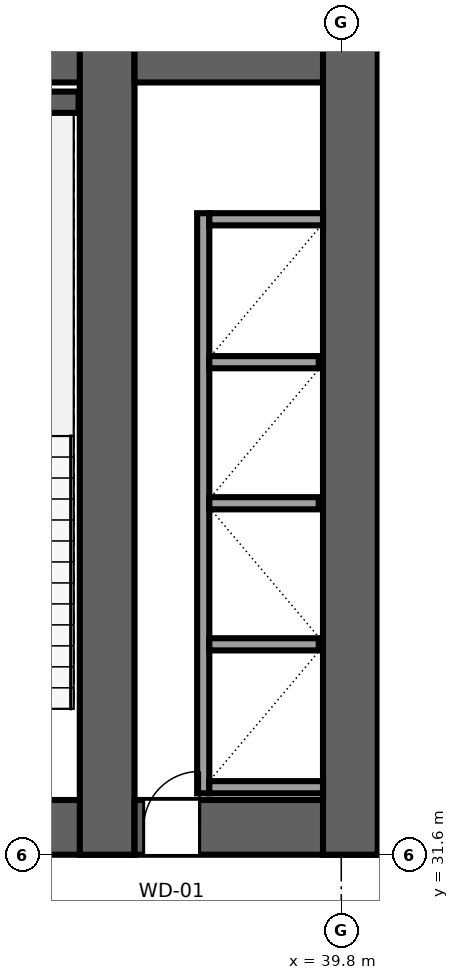
"""IFC4 building model, lengths in metres.
Left out: names, types, materials, properties, quantities, classifications, styles, units other than length and angle.
Written with IfcOpenShell. Run it as: python <this file> out.ifc"""

import sys

from ifc_helpers import new_model, si_unit, direction, frame, frame_2d, origin, place, context, subcontext, project, spatial, rectangle, extrude, source, transform, mapped, element, fill, save


model = new_model("IFC4")
c1 = context("Model", 3, precision=1e-05, world=origin(), true_north=direction((0.0, 1.0)))
c2 = subcontext(c1, "Body", "Model", "MODEL_VIEW")
j1 = project(units=[si_unit("LENGTHUNIT", "METRE"), si_unit("PLANEANGLEUNIT", "RADIAN")], contexts=[c1])
p1 = place(None, origin())
s1 = spatial("IfcSite", under=j1, at=p1, CompositionType="ELEMENT")
p2 = place(p1, origin())
s2 = spatial("IfcBuilding", under=s1, at=p2, CompositionType="ELEMENT")
p3 = place(p2, frame((0.0, 0.0, 11.0)))
s3 = spatial("IfcBuildingStorey", under=s2, at=p3, CompositionType="ELEMENT", Elevation=11.0)
p4 = place(p3, frame((9.6, 32.05, 0.0), z_axis=(0.0, 0.0, 1.0), x_axis=(1.0, 0.0, 0.0)))
e1 = element("IfcWall", 1, at=p4, inside=s3, PredefinedType="SHEAR", context=c2, shape_type="SweptSolid", body=[
    extrude(rectangle(XDim=26.8, YDim=0.9, at=frame_2d((13.4, 0.0))), origin(), (0.0, 0.0, 1.0), 5.0),
])
p5 = place(p4, frame((6.52, 0.0, 0.0), z_axis=(0.0, 0.0, 1.0), x_axis=(-1.0, 0.0, 0.0)))
e2 = element("IfcOpeningElement", 2, at=p5, cuts=e1, PredefinedType="OPENING", context=c2, shape_type="SweptSolid", body=[
    extrude(rectangle(XDim=1.5, YDim=2.04, at=frame_2d((0.75, 1.02))), frame((0.0, 0.46, 0.0), z_axis=(0.0, -1.0, 0.0), x_axis=(1.0, 0.0, 0.0)), (0.0, 0.0, 1.0), 0.92),
])
p6 = place(p4, frame((14.15, 0.0, 0.0), z_axis=(0.0, 0.0, 1.0), x_axis=(-1.0, 0.0, 0.0)))
e3 = element("IfcOpeningElement", 3, at=p6, cuts=e1, PredefinedType="OPENING", context=c2, shape_type="SweptSolid", body=[
    extrude(rectangle(XDim=1.5, YDim=2.04, at=frame_2d((0.75, 1.02))), frame((0.0, 0.46, 0.0), z_axis=(0.0, -1.0, 0.0), x_axis=(1.0, 0.0, 0.0)), (0.0, 0.0, 1.0), 0.92),
])
p7 = place(p4, frame((21.78, 0.0, 0.0), z_axis=(0.0, 0.0, 1.0), x_axis=(-1.0, 0.0, 0.0)))
e4 = element("IfcOpeningElement", 4, at=p7, cuts=e1, PredefinedType="OPENING", context=c2, shape_type="SweptSolid", body=[
    extrude(rectangle(XDim=1.5, YDim=2.04, at=frame_2d((0.75, 1.02))), frame((0.0, 0.46, 0.0), z_axis=(0.0, -1.0, 0.0), x_axis=(1.0, 0.0, 0.0)), (0.0, 0.0, 1.0), 0.92),
])
p8 = place(p4, frame((8.57, 0.0, 0.0), z_axis=(0.0, 0.0, 1.0), x_axis=(-1.0, 0.0, 0.0)))
e5 = element("IfcOpeningElement", 5, at=p8, cuts=e1, PredefinedType="OPENING", context=c2, shape_type="SweptSolid", body=[
    extrude(rectangle(XDim=0.82, YDim=2.01, at=frame_2d((0.41, 1.005))), frame((0.0, 0.46, 0.0), z_axis=(0.0, -1.0, 0.0), x_axis=(1.0, 0.0, 0.0)), (0.0, 0.0, 1.0), 0.92),
])
p9 = place(p4, frame((19.07, 0.0, 0.0), z_axis=(0.0, 0.0, 1.0), x_axis=(-1.0, 0.0, 0.0)))
e6 = element("IfcOpeningElement", 6, at=p9, cuts=e1, PredefinedType="OPENING", context=c2, shape_type="SweptSolid", body=[
    extrude(rectangle(XDim=0.82, YDim=2.01, at=frame_2d((0.41, 1.005))), frame((0.0, 0.46, 0.0), z_axis=(0.0, -1.0, 0.0), x_axis=(1.0, 0.0, 0.0)), (0.0, 0.0, 1.0), 0.92),
])
p10 = place(p3, frame((9.6, 44.75, 0.0), z_axis=(0.0, 0.0, 1.0), x_axis=(1.0, 0.0, 0.0)))
e7 = element("IfcWall", 7, at=p10, inside=s3, PredefinedType="SHEAR", context=c2, shape_type="SweptSolid", body=[
    extrude(rectangle(XDim=26.8, YDim=0.9, at=frame_2d((13.4, 0.0))), origin(), (0.0, 0.0, 1.0), 5.0),
])
p11 = place(p3, frame((35.95, 31.6, 0.0), z_axis=(0.0, 0.0, 1.0), x_axis=(0.0, 1.0, 0.0)))
e8 = element("IfcWall", 8, at=p11, inside=s3, PredefinedType="SHEAR", context=c2, shape_type="SweptSolid", body=[
    extrude(rectangle(XDim=13.6, YDim=0.9, at=frame_2d((6.8, 0.0))), origin(), (0.0, 0.0, 1.0), 5.0),
])
p12 = place(p3, frame((36.4, 32.05, 0.0), z_axis=(0.0, 0.0, 1.0), x_axis=(1.0, 0.0, 0.0)))
e9 = element("IfcWall", 9, at=p12, inside=s3, PredefinedType="SHEAR", context=c2, shape_type="SweptSolid", body=[
    extrude(rectangle(XDim=4.0, YDim=0.9, at=frame_2d((2.0, 0.0))), origin(), (0.0, 0.0, 1.0), 5.0),
])
p13 = place(p12, frame((1.07, 0.0, 0.0), z_axis=(0.0, 0.0, 1.0), x_axis=(-1.0, 0.0, 0.0)))
e10 = element("IfcOpeningElement", 10, at=p13, cuts=e9, PredefinedType="OPENING", context=c2, shape_type="SweptSolid", body=[
    extrude(rectangle(XDim=0.92, YDim=2.01, at=frame_2d((0.46, 1.005))), frame((0.0, 0.46, 0.0), z_axis=(0.0, -1.0, 0.0), x_axis=(1.0, 0.0, 0.0)), (0.0, 0.0, 1.0), 0.92),
])
p14 = place(p3, frame((36.4, 44.75, 0.0), z_axis=(0.0, 0.0, 1.0), x_axis=(1.0, 0.0, 0.0)))
e11 = element("IfcWall", 11, at=p14, inside=s3, PredefinedType="SHEAR", context=c2, shape_type="SweptSolid", body=[
    extrude(rectangle(XDim=4.0, YDim=0.9, at=frame_2d((2.0, 0.0))), origin(), (0.0, 0.0, 1.0), 5.0),
])
p15 = place(p3, frame((39.95, 31.6, 0.0), z_axis=(0.0, 0.0, 1.0), x_axis=(0.0, 1.0, 0.0)))
e12 = element("IfcWall", 12, at=p15, inside=s3, PredefinedType="SHEAR", context=c2, shape_type="SweptSolid", body=[
    extrude(rectangle(XDim=13.6, YDim=0.9, at=frame_2d((6.8, 0.0))), origin(), (0.0, 0.0, 1.0), 5.0),
])
p16 = place(p3, frame((31.88, 43.975, 0.0), z_axis=(0.0, 0.0, 1.0), x_axis=(1.0, 0.0, 0.0)))
e13 = element("IfcWall", 13, at=p16, inside=s3, PredefinedType="SHEAR", context=c2, shape_type="SweptSolid", body=[
    extrude(rectangle(XDim=3.6, YDim=0.35, at=frame_2d((1.8, 0.0))), origin(), (0.0, 0.0, 1.0), 5.0),
])
p17 = place(p3, frame((37.53, 32.61, 0.0), z_axis=(0.0, 0.0, 1.0), x_axis=(0.0, 1.0, 0.0)))
e14 = element("IfcWall", 14, at=p17, inside=s3, PredefinedType="SOLIDWALL", context=c2, shape_type="SweptSolid", body=[
    extrude(rectangle(XDim=9.54, YDim=0.2, at=frame_2d((4.77, 0.0))), origin(), (0.0, 0.0, 1.0), 4.74),
])
for number, where, z_axis, x_axis in (
    (15, (37.63, 32.71, 0.0), (0.0, 0.0, 1.0), (1.0, 0.0, 0.0)),
    (16, (37.63, 42.05, 0.0), (0.0, 0.0, 1.0), (1.0, 0.0, 0.0)),
):
    element("IfcWall", number, at=place(p3, frame(where, z_axis=z_axis, x_axis=x_axis)), inside=s3, PredefinedType="SOLIDWALL", context=c2, shape_type="SweptSolid", body=[
        extrude(rectangle(XDim=1.87, YDim=0.2, at=frame_2d((0.935, 0.0))), origin(), (0.0, 0.0, 1.0), 4.74),
    ])
for number, where, z_axis, x_axis in (
    (17, (37.63, 35.06, 0.0), (0.0, 0.0, 1.0), (1.0, 0.0, 0.0)),
    (18, (37.63, 37.38, 0.0), (0.0, 0.0, 1.0), (1.0, 0.0, 0.0)),
    (19, (37.63, 39.7, 0.0), (0.0, 0.0, 1.0), (1.0, 0.0, 0.0)),
):
    element("IfcWall", number, at=place(p3, frame(where, z_axis=z_axis, x_axis=x_axis)), inside=s3, PredefinedType="SOLIDWALL", context=c2, shape_type="SweptSolid", body=[
        extrude(rectangle(XDim=1.8, YDim=0.2, at=frame_2d((0.9, 0.0))), origin(), (0.0, 0.0, 1.0), 4.74),
    ])
m1 = source(origin(), c2, "Body", "SweptSolid", [
    extrude(rectangle(XDim=0.92, YDim=2.01, at=frame_2d((0.46, 1.005))), frame((0.0, 0.025, 0.0), z_axis=(0.0, -1.0, 0.0), x_axis=(1.0, 0.0, 0.0)), (0.0, 0.0, 1.0), 0.05),
])
p18 = place(p13, origin())
e20 = element("IfcDoor", 20, at=p18, inside=s3, OperationType="SINGLE_SWING_RIGHT", PredefinedType="DOOR", context=c2, shape_type="MappedRepresentation", body=[
    mapped(m1, transform((0.0, 0.0, 0.0), x_axis=(1.0, 0.0, 0.0), y_axis=(0.0, 1.0, 0.0), z_axis=(0.0, 0.0, 1.0), scale=1.0)),
])
fill(e10, e20)
save(model, sys.argv[1])
